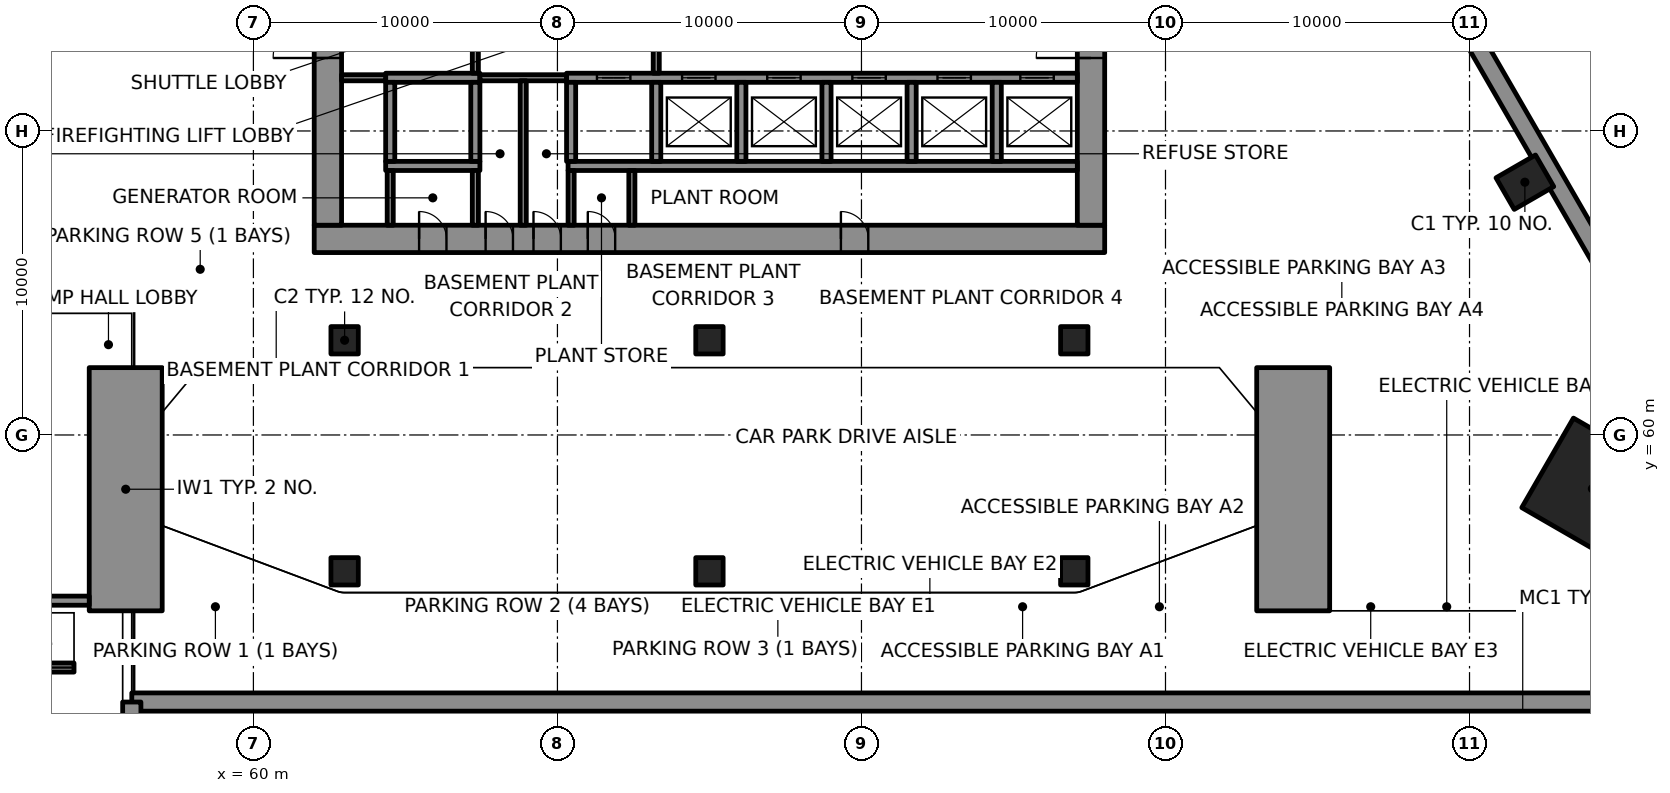
"""IFC4 building model, lengths in metres.
Left out: names, types, materials, properties, quantities, classifications, styles, units other than length and angle.
Written with IfcOpenShell. Run it as: python <this file> out.ifc"""

import sys

from ifc_helpers import new_model, si_unit, direction, frame, frame_2d, origin, origin_2d, place, context, subcontext, project, spatial, rectangle, extrude, element, fill, save


model = new_model("IFC4")
c1 = context("Model", 3, precision=1e-05, world=origin(), true_north=direction((0.0, 1.0)))
c2 = subcontext(c1, "Body", "Model", "MODEL_VIEW")
j1 = project(units=[si_unit("LENGTHUNIT", "METRE"), si_unit("PLANEANGLEUNIT", "RADIAN")], contexts=[c1])
p1 = place(None, origin())
s1 = spatial("IfcSite", under=j1, at=p1, CompositionType="ELEMENT")
p2 = place(p1, origin())
s2 = spatial("IfcBuilding", under=s1, at=p2, CompositionType="ELEMENT")
p3 = place(p2, frame((0.0, 0.0, -5.0)))
s3 = spatial("IfcBuildingStorey", under=s2, at=p3, CompositionType="ELEMENT", Elevation=-5.0)
p4 = place(p3, frame((56.0, 51.215, -0.35), z_axis=(0.0, 0.0, 1.0), x_axis=(1.0, 0.0, 0.0)))
e1 = element("IfcWall", 1, at=p4, inside=s3, PredefinedType="SOLIDWALL", context=c2, shape_type="SweptSolid", body=[
    extrude(rectangle(XDim=49.532, YDim=0.6, at=frame_2d((24.766, 0.0))), origin(), (0.0, 0.0, 1.0), 5.05),
])
p5 = place(p3, frame((109.132, 57.451, -0.35), z_axis=(0.0, 0.0, 1.0), x_axis=(-0.499999206999, 0.866025861623, 0.0)))
e2 = element("IfcWall", 2, at=p5, inside=s3, PredefinedType="SOLIDWALL", context=c2, shape_type="SweptSolid", body=[
    extrude(rectangle(XDim=61.064, YDim=0.6, at=frame_2d((30.532, 0.0))), origin(), (0.0, 0.0, 1.0), 5.05),
])
p6 = place(p3, frame((67.936, 110.334, -0.35), z_axis=(0.0, 0.0, 1.0), x_axis=(-0.499999089162, -0.866025929656, 0.0)))
e3 = element("IfcWall", 3, at=p6, inside=s3, PredefinedType="SOLIDWALL", context=c2, shape_type="SweptSolid", body=[
    extrude(rectangle(XDim=53.501, YDim=0.6, at=frame_2d((26.751, 0.0))), origin(), (0.0, 0.0, 1.0), 5.05),
])
p7 = place(p3, frame((56.0, 40.0, -0.35), z_axis=(0.0, 0.0, 1.0), x_axis=(0.0, 1.0, 0.0)))
e4 = element("IfcWall", 4, at=p7, inside=s3, PredefinedType="SOLIDWALL", context=c2, shape_type="SweptSolid", body=[
    extrude(rectangle(XDim=11.215, YDim=0.6, at=frame_2d((5.608, 0.0))), origin(), (0.0, 0.0, 1.0), 5.05),
])
for number, where, z_axis, x_axis in (
    (5, (55.8, 54.215, -0.35), (0.0, 0.0, 1.0), (0.0, 1.0, 0.0)),
    (6, (94.2, 54.215, -0.35), (0.0, 0.0, 1.0), (0.0, 1.0, 0.0)),
):
    element("IfcWall", number, at=place(p3, frame(where, z_axis=z_axis, x_axis=x_axis)), inside=s3, PredefinedType="SHEAR", context=c2, shape_type="SweptSolid", body=[
        extrude(rectangle(XDim=8.0, YDim=2.4, at=frame_2d((4.0, 0.0))), origin(), (0.0, 0.0, 1.0), 5.05),
    ])
p8 = place(p3, frame((101.821, 68.315, 0.0), z_axis=(0.0, 0.0, 1.0), x_axis=(-0.5, 0.866025403784, 0.0)))
e7 = element("IfcColumn", 7, at=p8, inside=s3, PredefinedType="COLUMN", context=c2, shape_type="SweptSolid", body=[
    extrude(rectangle(XDim=1.2, YDim=1.5, at=origin_2d()), origin(), (0.0, 0.0, 1.0), 5.0),
])
for number, where, z_axis, x_axis in (
    (8, (63.0, 63.115, 0.0), (0.0, 0.0, 1.0), (1.0, 0.0, 0.0)),
    (9, (75.0, 63.115, 0.0), (0.0, 0.0, 1.0), (1.0, 0.0, 0.0)),
    (10, (87.0, 63.115, 0.0), (0.0, 0.0, 1.0), (1.0, 0.0, 0.0)),
    (11, (63.0, 55.515, 0.0), (0.0, 0.0, 1.0), (1.0, 0.0, 0.0)),
    (12, (75.0, 55.515, 0.0), (0.0, 0.0, 1.0), (1.0, 0.0, 0.0)),
    (13, (87.0, 55.515, 0.0), (0.0, 0.0, 1.0), (1.0, 0.0, 0.0)),
):
    element("IfcColumn", number, at=place(p3, frame(where, z_axis=z_axis, x_axis=x_axis)), inside=s3, PredefinedType="COLUMN", context=c2, shape_type="SweptSolid", body=[
        extrude(rectangle(XDim=0.9, YDim=0.9, at=origin_2d()), origin(), (0.0, 0.0, 1.0), 5.0),
    ])
p9 = place(p3, frame((104.041, 58.233, 0.0), z_axis=(0.0, 0.0, 1.0), x_axis=(0.5, 0.866025403784, 0.0)))
e14 = element("IfcColumn", 14, at=p9, inside=s3, PredefinedType="COLUMN", context=c2, shape_type="SweptSolid", body=[
    extrude(rectangle(XDim=3.4, YDim=3.4, at=origin_2d()), origin(), (0.0, 0.0, 1.0), 5.0),
])
p10 = place(p3, frame((62.0, 66.45, 0.0), z_axis=(0.0, 0.0, 1.0), x_axis=(1.0, 0.0, 0.0)))
e15 = element("IfcWall", 15, at=p10, inside=s3, PredefinedType="SHEAR", context=c2, shape_type="SweptSolid", body=[
    extrude(rectangle(XDim=26.0, YDim=0.9, at=frame_2d((13.0, 0.0))), origin(), (0.0, 0.0, 1.0), 4.7),
])
p11 = place(p10, frame((3.45, 0.0, 0.0)))
e16 = element("IfcOpeningElement", 16, at=p11, cuts=e15, PredefinedType="OPENING", context=c2, shape_type="SweptSolid", body=[
    extrude(rectangle(XDim=0.9, YDim=2.1, at=frame_2d((0.45, 1.05))), frame((0.0, 0.46, 0.0), z_axis=(0.0, -1.0, 0.0), x_axis=(1.0, 0.0, 0.0)), (0.0, 0.0, 1.0), 0.92),
])
p12 = place(p10, frame((5.637, 0.0, 0.0)))
e17 = element("IfcOpeningElement", 17, at=p12, cuts=e15, PredefinedType="OPENING", context=c2, shape_type="SweptSolid", body=[
    extrude(rectangle(XDim=0.9, YDim=2.1, at=frame_2d((0.45, 1.05))), frame((0.0, 0.46, 0.0), z_axis=(0.0, -1.0, 0.0), x_axis=(1.0, 0.0, 0.0)), (0.0, 0.0, 1.0), 0.92),
])
p13 = place(p10, frame((7.212, 0.0, 0.0)))
e18 = element("IfcOpeningElement", 18, at=p13, cuts=e15, PredefinedType="OPENING", context=c2, shape_type="SweptSolid", body=[
    extrude(rectangle(XDim=0.9, YDim=2.1, at=frame_2d((0.45, 1.05))), frame((0.0, 0.46, 0.0), z_axis=(0.0, -1.0, 0.0), x_axis=(1.0, 0.0, 0.0)), (0.0, 0.0, 1.0), 0.92),
])
p14 = place(p10, frame((8.999, 0.0, 0.0)))
e19 = element("IfcOpeningElement", 19, at=p14, cuts=e15, PredefinedType="OPENING", context=c2, shape_type="SweptSolid", body=[
    extrude(rectangle(XDim=0.9, YDim=2.1, at=frame_2d((0.45, 1.05))), frame((0.0, 0.46, 0.0), z_axis=(0.0, -1.0, 0.0), x_axis=(1.0, 0.0, 0.0)), (0.0, 0.0, 1.0), 0.92),
])
p15 = place(p10, frame((17.324, 0.0, 0.0)))
e20 = element("IfcOpeningElement", 20, at=p15, cuts=e15, PredefinedType="OPENING", context=c2, shape_type="SweptSolid", body=[
    extrude(rectangle(XDim=0.9, YDim=2.1, at=frame_2d((0.45, 1.05))), frame((0.0, 0.46, 0.0), z_axis=(0.0, -1.0, 0.0), x_axis=(1.0, 0.0, 0.0)), (0.0, 0.0, 1.0), 0.92),
])
p16 = place(p3, frame((62.45, 66.9, 0.0), z_axis=(0.0, 0.0, 1.0), x_axis=(0.0, 1.0, 0.0)))
e21 = element("IfcWall", 21, at=p16, inside=s3, PredefinedType="SHEAR", context=c2, shape_type="SweptSolid", body=[
    extrude(rectangle(XDim=16.2, YDim=0.9, at=frame_2d((8.1, 0.0))), origin(), (0.0, 0.0, 1.0), 4.7),
])
p17 = place(p16, frame((5.5, 0.0, 0.0)))
e22 = element("IfcOpeningElement", 22, at=p17, cuts=e21, PredefinedType="OPENING", context=c2, shape_type="SweptSolid", body=[
    extrude(rectangle(XDim=1.8, YDim=2.1, at=frame_2d((0.9, 1.05))), frame((0.0, 0.46, 0.0), z_axis=(0.0, -1.0, 0.0), x_axis=(1.0, 0.0, 0.0)), (0.0, 0.0, 1.0), 0.92),
])
p18 = place(p3, frame((87.55, 66.9, 0.0), z_axis=(0.0, 0.0, 1.0), x_axis=(0.0, 1.0, 0.0)))
e23 = element("IfcWall", 23, at=p18, inside=s3, PredefinedType="SHEAR", context=c2, shape_type="SweptSolid", body=[
    extrude(rectangle(XDim=16.2, YDim=0.9, at=frame_2d((8.1, 0.0))), origin(), (0.0, 0.0, 1.0), 4.7),
])
p19 = place(p18, frame((5.5, 0.0, 0.0)))
e24 = element("IfcOpeningElement", 24, at=p19, cuts=e23, PredefinedType="OPENING", context=c2, shape_type="SweptSolid", body=[
    extrude(rectangle(XDim=1.8, YDim=2.1, at=frame_2d((0.9, 1.05))), frame((0.0, 0.46, 0.0), z_axis=(0.0, -1.0, 0.0), x_axis=(1.0, 0.0, 0.0)), (0.0, 0.0, 1.0), 0.92),
])
p20 = place(p18, frame((11.202, 0.0, 0.0)))
e25 = element("IfcOpeningElement", 25, at=p20, cuts=e23, PredefinedType="OPENING", context=c2, shape_type="SweptSolid", body=[
    extrude(rectangle(XDim=0.9, YDim=2.1, at=frame_2d((0.45, 1.05))), frame((0.0, 0.46, 0.0), z_axis=(0.0, -1.0, 0.0), x_axis=(1.0, 0.0, 0.0)), (0.0, 0.0, 1.0), 0.92),
])
p21 = place(p3, frame((64.35, 68.85, 0.0), z_axis=(0.0, 0.0, 1.0), x_axis=(1.0, 0.0, 0.0)))
e26 = element("IfcWall", 26, at=p21, inside=s3, PredefinedType="SHEAR", context=c2, shape_type="SweptSolid", body=[
    extrude(rectangle(XDim=3.1, YDim=0.3, at=frame_2d((1.55, 0.0))), origin(), (0.0, 0.0, 1.0), 4.7),
])
p22 = place(p3, frame((70.35, 68.85, 0.0), z_axis=(0.0, 0.0, 1.0), x_axis=(1.0, 0.0, 0.0)))
e27 = element("IfcWall", 27, at=p22, inside=s3, PredefinedType="SHEAR", context=c2, shape_type="SweptSolid", body=[
    extrude(rectangle(XDim=16.75, YDim=0.3, at=frame_2d((8.375, 0.0))), origin(), (0.0, 0.0, 1.0), 4.7),
])
p23 = place(p3, frame((64.35, 71.75, 0.0), z_axis=(0.0, 0.0, 1.0), x_axis=(1.0, 0.0, 0.0)))
e28 = element("IfcWall", 28, at=p23, inside=s3, PredefinedType="SHEAR", context=c2, shape_type="SweptSolid", body=[
    extrude(rectangle(XDim=3.1, YDim=0.3, at=frame_2d((1.55, 0.0))), origin(), (0.0, 0.0, 1.0), 4.7),
])
p24 = place(p3, frame((70.3, 71.75, 0.0), z_axis=(0.0, 0.0, 1.0), x_axis=(1.0, 0.0, 0.0)))
e29 = element("IfcWall", 29, at=p24, inside=s3, PredefinedType="SHEAR", context=c2, shape_type="SweptSolid", body=[
    extrude(rectangle(XDim=16.8, YDim=0.3, at=frame_2d((8.4, 0.0))), origin(), (0.0, 0.0, 1.0), 4.7),
])
p25 = place(p24, frame((1.0, 0.0, 0.0)))
e30 = element("IfcOpeningElement", 30, at=p25, cuts=e29, PredefinedType="OPENING", context=c2, shape_type="SweptSolid", body=[
    extrude(rectangle(XDim=1.1, YDim=2.1, at=frame_2d((0.55, 1.05))), frame((0.0, 0.16, 0.0), z_axis=(0.0, -1.0, 0.0), x_axis=(1.0, 0.0, 0.0)), (0.0, 0.0, 1.0), 0.32),
])
p26 = place(p24, frame((3.8, 0.0, 0.0)))
e31 = element("IfcOpeningElement", 31, at=p26, cuts=e29, PredefinedType="OPENING", context=c2, shape_type="SweptSolid", body=[
    extrude(rectangle(XDim=1.1, YDim=2.1, at=frame_2d((0.55, 1.05))), frame((0.0, 0.16, 0.0), z_axis=(0.0, -1.0, 0.0), x_axis=(1.0, 0.0, 0.0)), (0.0, 0.0, 1.0), 0.32),
])
p27 = place(p24, frame((6.6, 0.0, 0.0)))
e32 = element("IfcOpeningElement", 32, at=p27, cuts=e29, PredefinedType="OPENING", context=c2, shape_type="SweptSolid", body=[
    extrude(rectangle(XDim=1.1, YDim=2.1, at=frame_2d((0.55, 1.05))), frame((0.0, 0.16, 0.0), z_axis=(0.0, -1.0, 0.0), x_axis=(1.0, 0.0, 0.0)), (0.0, 0.0, 1.0), 0.32),
])
p28 = place(p24, frame((9.4, 0.0, 0.0)))
e33 = element("IfcOpeningElement", 33, at=p28, cuts=e29, PredefinedType="OPENING", context=c2, shape_type="SweptSolid", body=[
    extrude(rectangle(XDim=1.1, YDim=2.1, at=frame_2d((0.55, 1.05))), frame((0.0, 0.16, 0.0), z_axis=(0.0, -1.0, 0.0), x_axis=(1.0, 0.0, 0.0)), (0.0, 0.0, 1.0), 0.32),
])
p29 = place(p24, frame((12.2, 0.0, 0.0)))
e34 = element("IfcOpeningElement", 34, at=p29, cuts=e29, PredefinedType="OPENING", context=c2, shape_type="SweptSolid", body=[
    extrude(rectangle(XDim=1.1, YDim=2.1, at=frame_2d((0.55, 1.05))), frame((0.0, 0.16, 0.0), z_axis=(0.0, -1.0, 0.0), x_axis=(1.0, 0.0, 0.0)), (0.0, 0.0, 1.0), 0.32),
])
p30 = place(p24, frame((14.925, 0.0, 0.0)))
e35 = element("IfcOpeningElement", 35, at=p30, cuts=e29, PredefinedType="OPENING", context=c2, shape_type="SweptSolid", body=[
    extrude(rectangle(XDim=1.1, YDim=2.1, at=frame_2d((0.55, 1.05))), frame((0.0, 0.16, 0.0), z_axis=(0.0, -1.0, 0.0), x_axis=(1.0, 0.0, 0.0)), (0.0, 0.0, 1.0), 0.32),
])
for number, where, z_axis, x_axis in (
    (36, (64.5, 69.0, 0.0), (0.0, 0.0, 1.0), (0.0, 1.0, 0.0)),
    (37, (67.3, 69.0, 0.0), (0.0, 0.0, 1.0), (0.0, 1.0, 0.0)),
    (38, (70.45, 69.0, 0.0), (0.0, 0.0, 1.0), (0.0, 1.0, 0.0)),
    (39, (73.25, 69.0, 0.0), (0.0, 0.0, 1.0), (0.0, 1.0, 0.0)),
    (40, (76.05, 69.0, 0.0), (0.0, 0.0, 1.0), (0.0, 1.0, 0.0)),
    (41, (78.85, 69.0, 0.0), (0.0, 0.0, 1.0), (0.0, 1.0, 0.0)),
    (42, (81.65, 69.0, 0.0), (0.0, 0.0, 1.0), (0.0, 1.0, 0.0)),
    (43, (84.45, 69.0, 0.0), (0.0, 0.0, 1.0), (0.0, 1.0, 0.0)),
):
    element("IfcWall", number, at=place(p3, frame(where, z_axis=z_axis, x_axis=x_axis)), inside=s3, PredefinedType="SHEAR", context=c2, shape_type="SweptSolid", body=[
        extrude(rectangle(XDim=2.6, YDim=0.3, at=frame_2d((1.3, 0.0))), origin(), (0.0, 0.0, 1.0), 4.7),
    ])
p31 = place(p3, frame((62.9, 71.75, 0.0), z_axis=(0.0, 0.0, 1.0), x_axis=(1.0, 0.0, 0.0)))
e44 = element("IfcWall", 44, at=p31, inside=s3, PredefinedType="PARTITIONING", context=c2, shape_type="SweptSolid", body=[
    extrude(rectangle(XDim=1.45, YDim=0.2, at=frame_2d((0.725, 0.0))), origin(), (0.0, 0.0, 1.0), 4.7),
])
p32 = place(p3, frame((67.45, 71.75, 0.0), z_axis=(0.0, 0.0, 1.0), x_axis=(1.0, 0.0, 0.0)))
e45 = element("IfcWall", 45, at=p32, inside=s3, PredefinedType="PARTITIONING", context=c2, shape_type="SweptSolid", body=[
    extrude(rectangle(XDim=2.85, YDim=0.2, at=frame_2d((1.425, 0.0))), origin(), (0.0, 0.0, 1.0), 4.7),
])
for number, where, z_axis, x_axis in (
    (46, (64.5, 66.9, 0.0), (0.0, 0.0, 1.0), (0.0, 1.0, 0.0)),
    (47, (67.3, 66.9, 0.0), (0.0, 0.0, 1.0), (0.0, 1.0, 0.0)),
):
    element("IfcWall", number, at=place(p3, frame(where, z_axis=z_axis, x_axis=x_axis)), inside=s3, PredefinedType="PARTITIONING", context=c2, shape_type="SweptSolid", body=[
        extrude(rectangle(XDim=1.8, YDim=0.2, at=frame_2d((0.9, 0.0))), origin(), (0.0, 0.0, 1.0), 4.7),
    ])
p33 = place(p3, frame((67.3, 71.9, 0.0), z_axis=(0.0, 0.0, 1.0), x_axis=(0.0, 1.0, 0.0)))
e48 = element("IfcWall", 48, at=p33, inside=s3, PredefinedType="PARTITIONING", context=c2, shape_type="SweptSolid", body=[
    extrude(rectangle(XDim=2.8, YDim=0.2, at=frame_2d((1.4, 0.0))), origin(), (0.0, 0.0, 1.0), 4.7),
])
p34 = place(p33, frame((0.8, 0.0, 0.0)))
e49 = element("IfcOpeningElement", 49, at=p34, cuts=e48, PredefinedType="OPENING", context=c2, shape_type="SweptSolid", body=[
    extrude(rectangle(XDim=1.2, YDim=2.1, at=frame_2d((0.6, 1.05))), frame((0.0, 0.11, 0.0), z_axis=(0.0, -1.0, 0.0), x_axis=(1.0, 0.0, 0.0)), (0.0, 0.0, 1.0), 0.22),
])
p35 = place(p3, frame((68.875, 66.9, 0.0), z_axis=(0.0, 0.0, 1.0), x_axis=(0.0, 1.0, 0.0)))
e50 = element("IfcWall", 50, at=p35, inside=s3, PredefinedType="PARTITIONING", context=c2, shape_type="SweptSolid", body=[
    extrude(rectangle(XDim=4.75, YDim=0.2, at=frame_2d((2.375, 0.0))), origin(), (0.0, 0.0, 1.0), 4.7),
])
for number, where, z_axis, x_axis in (
    (51, (70.45, 66.9, 0.0), (0.0, 0.0, 1.0), (0.0, 1.0, 0.0)),
    (52, (72.448, 66.9, 0.0), (0.0, 0.0, 1.0), (0.0, 1.0, 0.0)),
):
    element("IfcWall", number, at=place(p3, frame(where, z_axis=z_axis, x_axis=x_axis)), inside=s3, PredefinedType="PARTITIONING", context=c2, shape_type="SweptSolid", body=[
        extrude(rectangle(XDim=1.8, YDim=0.2, at=frame_2d((0.9, 0.0))), origin(), (0.0, 0.0, 1.0), 4.7),
    ])
p36 = place(p3, frame((73.25, 71.9, 0.0), z_axis=(0.0, 0.0, 1.0), x_axis=(0.0, 1.0, 0.0)))
e53 = element("IfcWall", 53, at=p36, inside=s3, PredefinedType="PARTITIONING", context=c2, shape_type="SweptSolid", body=[
    extrude(rectangle(XDim=2.8, YDim=0.2, at=frame_2d((1.4, 0.0))), origin(), (0.0, 0.0, 1.0), 4.7),
])
p37 = place(p36, frame((0.8, 0.0, 0.0)))
e54 = element("IfcOpeningElement", 54, at=p37, cuts=e53, PredefinedType="OPENING", context=c2, shape_type="SweptSolid", body=[
    extrude(rectangle(XDim=1.2, YDim=2.1, at=frame_2d((0.6, 1.05))), frame((0.0, 0.11, 0.0), z_axis=(0.0, -1.0, 0.0), x_axis=(1.0, 0.0, 0.0)), (0.0, 0.0, 1.0), 0.22),
])
p38 = place(p3, frame((44.0, 54.55, 0.0), z_axis=(0.0, 0.0, 1.0), x_axis=(1.0, 0.0, 0.0)))
e55 = element("IfcWall", 55, at=p38, inside=s3, PredefinedType="SOLIDWALL", context=c2, shape_type="SweptSolid", body=[
    extrude(rectangle(XDim=10.6, YDim=0.3, at=frame_2d((5.3, 0.0))), origin(), (0.0, 0.0, 1.0), 4.7),
])
p39 = place(p3, frame((47.0, 52.35, 0.0), z_axis=(0.0, 0.0, 1.0), x_axis=(1.0, 0.0, 0.0)))
e56 = element("IfcWall", 56, at=p39, inside=s3, PredefinedType="SOLIDWALL", context=c2, shape_type="SweptSolid", body=[
    extrude(rectangle(XDim=7.1, YDim=0.3, at=frame_2d((3.55, 0.0))), origin(), (0.0, 0.0, 1.0), 4.7),
])
p40 = place(p25, origin())
e57 = element("IfcDoor", 57, at=p40, inside=s3, OperationType="DOUBLE_DOOR_SLIDING", PredefinedType="DOOR", context=c2, shape_type="SweptSolid", body=[
    extrude(rectangle(XDim=1.1, YDim=2.1, at=frame_2d((0.55, 1.05))), frame((0.0, 0.025, 0.0), z_axis=(0.0, -1.0, 0.0), x_axis=(1.0, 0.0, 0.0)), (0.0, 0.0, 1.0), 0.05),
])
fill(e30, e57)
p41 = place(p26, origin())
e58 = element("IfcDoor", 58, at=p41, inside=s3, OperationType="DOUBLE_DOOR_SLIDING", PredefinedType="DOOR", context=c2, shape_type="SweptSolid", body=[
    extrude(rectangle(XDim=1.1, YDim=2.1, at=frame_2d((0.55, 1.05))), frame((0.0, 0.025, 0.0), z_axis=(0.0, -1.0, 0.0), x_axis=(1.0, 0.0, 0.0)), (0.0, 0.0, 1.0), 0.05),
])
fill(e31, e58)
p42 = place(p27, origin())
e59 = element("IfcDoor", 59, at=p42, inside=s3, OperationType="DOUBLE_DOOR_SLIDING", PredefinedType="DOOR", context=c2, shape_type="SweptSolid", body=[
    extrude(rectangle(XDim=1.1, YDim=2.1, at=frame_2d((0.55, 1.05))), frame((0.0, 0.025, 0.0), z_axis=(0.0, -1.0, 0.0), x_axis=(1.0, 0.0, 0.0)), (0.0, 0.0, 1.0), 0.05),
])
fill(e32, e59)
p43 = place(p28, origin())
e60 = element("IfcDoor", 60, at=p43, inside=s3, OperationType="DOUBLE_DOOR_SLIDING", PredefinedType="DOOR", context=c2, shape_type="SweptSolid", body=[
    extrude(rectangle(XDim=1.1, YDim=2.1, at=frame_2d((0.55, 1.05))), frame((0.0, 0.025, 0.0), z_axis=(0.0, -1.0, 0.0), x_axis=(1.0, 0.0, 0.0)), (0.0, 0.0, 1.0), 0.05),
])
fill(e33, e60)
p44 = place(p29, origin())
e61 = element("IfcDoor", 61, at=p44, inside=s3, OperationType="DOUBLE_DOOR_SLIDING", PredefinedType="DOOR", context=c2, shape_type="SweptSolid", body=[
    extrude(rectangle(XDim=1.1, YDim=2.1, at=frame_2d((0.55, 1.05))), frame((0.0, 0.025, 0.0), z_axis=(0.0, -1.0, 0.0), x_axis=(1.0, 0.0, 0.0)), (0.0, 0.0, 1.0), 0.05),
])
fill(e34, e61)
p45 = place(p30, origin())
e62 = element("IfcDoor", 62, at=p45, inside=s3, OperationType="DOUBLE_DOOR_SLIDING", PredefinedType="DOOR", context=c2, shape_type="SweptSolid", body=[
    extrude(rectangle(XDim=1.1, YDim=2.1, at=frame_2d((0.55, 1.05))), frame((0.0, 0.025, 0.0), z_axis=(0.0, -1.0, 0.0), x_axis=(1.0, 0.0, 0.0)), (0.0, 0.0, 1.0), 0.05),
])
fill(e35, e62)
p46 = place(p17, origin())
e63 = element("IfcDoor", 63, at=p46, inside=s3, OperationType="SINGLE_SWING_LEFT", PredefinedType="DOOR", context=c2, shape_type="SweptSolid", body=[
    extrude(rectangle(XDim=1.8, YDim=2.1, at=frame_2d((0.9, 1.05))), frame((0.0, 0.17, 0.0), z_axis=(0.0, -1.0, 0.0), x_axis=(1.0, 0.0, 0.0)), (0.0, 0.0, 1.0), 0.34),
])
fill(e22, e63)
p47 = place(p19, origin())
e64 = element("IfcDoor", 64, at=p47, inside=s3, OperationType="SINGLE_SWING_RIGHT", PredefinedType="DOOR", context=c2, shape_type="SweptSolid", body=[
    extrude(rectangle(XDim=1.8, YDim=2.1, at=frame_2d((0.9, 1.05))), frame((0.0, 0.17, 0.0), z_axis=(0.0, -1.0, 0.0), x_axis=(1.0, 0.0, 0.0)), (0.0, 0.0, 1.0), 0.34),
])
fill(e24, e64)
p48 = place(p11, origin())
e65 = element("IfcDoor", 65, at=p48, inside=s3, OperationType="SINGLE_SWING_LEFT", PredefinedType="DOOR", context=c2, shape_type="SweptSolid", body=[
    extrude(rectangle(XDim=0.9, YDim=2.1, at=frame_2d((0.45, 1.05))), frame((0.0, 0.17, 0.0), z_axis=(0.0, -1.0, 0.0), x_axis=(1.0, 0.0, 0.0)), (0.0, 0.0, 1.0), 0.34),
])
fill(e16, e65)
p49 = place(p12, origin())
e66 = element("IfcDoor", 66, at=p49, inside=s3, OperationType="SINGLE_SWING_RIGHT", PredefinedType="DOOR", context=c2, shape_type="SweptSolid", body=[
    extrude(rectangle(XDim=0.9, YDim=2.1, at=frame_2d((0.45, 1.05))), frame((0.0, 0.17, 0.0), z_axis=(0.0, -1.0, 0.0), x_axis=(1.0, 0.0, 0.0)), (0.0, 0.0, 1.0), 0.34),
])
fill(e17, e66)
p50 = place(p13, origin())
e67 = element("IfcDoor", 67, at=p50, inside=s3, OperationType="SINGLE_SWING_LEFT", PredefinedType="DOOR", context=c2, shape_type="SweptSolid", body=[
    extrude(rectangle(XDim=0.9, YDim=2.1, at=frame_2d((0.45, 1.05))), frame((0.0, 0.17, 0.0), z_axis=(0.0, -1.0, 0.0), x_axis=(1.0, 0.0, 0.0)), (0.0, 0.0, 1.0), 0.34),
])
fill(e18, e67)
p51 = place(p14, origin())
e68 = element("IfcDoor", 68, at=p51, inside=s3, OperationType="SINGLE_SWING_RIGHT", PredefinedType="DOOR", context=c2, shape_type="SweptSolid", body=[
    extrude(rectangle(XDim=0.9, YDim=2.1, at=frame_2d((0.45, 1.05))), frame((0.0, 0.17, 0.0), z_axis=(0.0, -1.0, 0.0), x_axis=(1.0, 0.0, 0.0)), (0.0, 0.0, 1.0), 0.34),
])
fill(e19, e68)
p52 = place(p15, origin())
e69 = element("IfcDoor", 69, at=p52, inside=s3, OperationType="SINGLE_SWING_LEFT", PredefinedType="DOOR", context=c2, shape_type="SweptSolid", body=[
    extrude(rectangle(XDim=0.9, YDim=2.1, at=frame_2d((0.45, 1.05))), frame((0.0, 0.17, 0.0), z_axis=(0.0, -1.0, 0.0), x_axis=(1.0, 0.0, 0.0)), (0.0, 0.0, 1.0), 0.34),
])
fill(e20, e69)
save(model, sys.argv[1])
